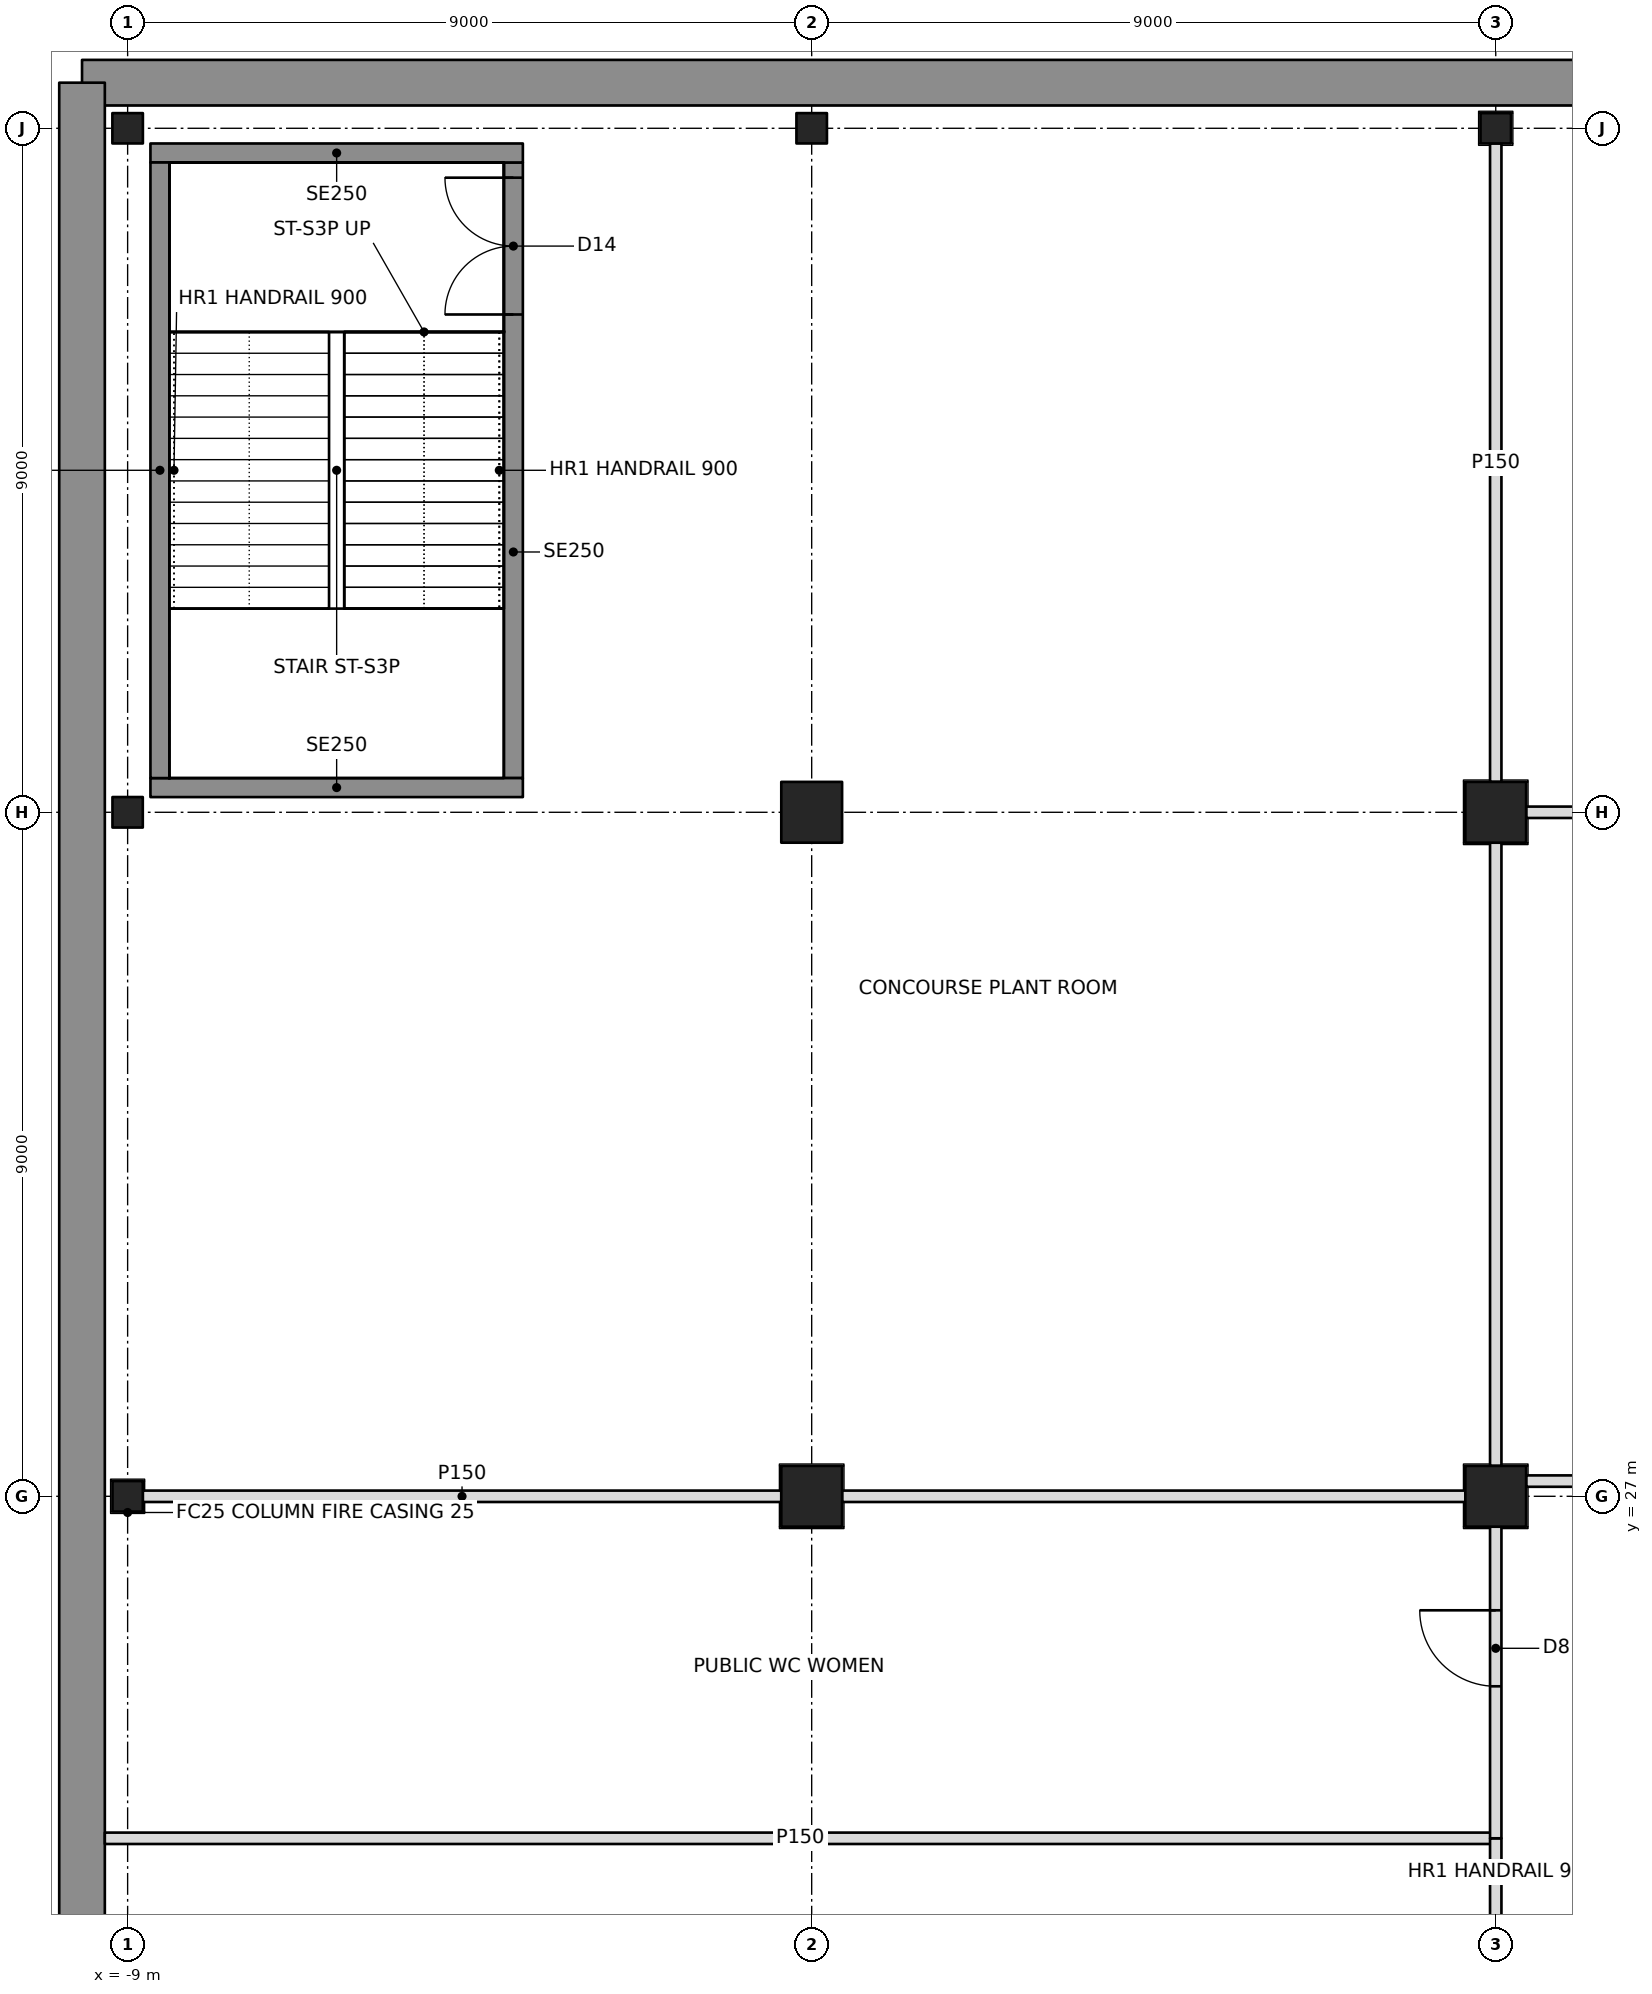
"""IFC4 building model, lengths in metres.
Left out: names, types, materials, properties, quantities, classifications, styles, units other than length and angle.
Written with IfcOpenShell. Run it as: python <this file> out.ifc"""

import sys

from ifc_helpers import new_model, si_unit, direction, frame, frame_2d, origin, origin_2d, place, context, subcontext, project, spatial, rectangle, hollow_rectangle, i_section, extrude, element, fill, save


model = new_model("IFC4")
c1 = context("Model", 3, precision=1e-05, world=origin(), true_north=direction((0.0, 1.0)))
c2 = subcontext(c1, "Body", "Model", "MODEL_VIEW")
j1 = project(units=[si_unit("LENGTHUNIT", "METRE"), si_unit("PLANEANGLEUNIT", "RADIAN")], contexts=[c1])
p1 = place(None, origin())
s1 = spatial("IfcSite", under=j1, at=p1, CompositionType="ELEMENT")
p2 = place(p1, origin())
s2 = spatial("IfcBuilding", under=s1, at=p2, CompositionType="ELEMENT")
p3 = place(p2, frame((0.0, 0.0, -5.5)))
s3 = spatial("IfcBuildingStorey", under=s2, at=p3, CompositionType="ELEMENT", Elevation=-5.5)
for number, where, z_axis, x_axis in (
    (1, (-9.0, 27.0, 0.0), (0.0, 0.0, 1.0), (0.0, 1.0, 0.0)),
    (2, (-9.0, 36.0, 0.0), (0.0, 0.0, 1.0), (0.0, 1.0, 0.0)),
    (3, (-9.0, 45.0, 0.0), (0.0, 0.0, 1.0), (1.0, 0.0, 0.0)),
):
    element("IfcColumn", number, at=place(p3, frame(where, z_axis=z_axis, x_axis=x_axis)), inside=s3, PredefinedType="COLUMN", context=c2, shape_type="SweptSolid", body=[
        extrude(i_section(OverallWidth=0.401, OverallDepth=0.399, WebThickness=0.025, FlangeThickness=0.04, at=origin_2d()), origin(), (0.0, 0.0, 1.0), 5.5),
    ])
for number, where, z_axis, x_axis in (
    (4, (0.0, 27.0, 0.0), (0.0, 0.0, 1.0), (0.0, 1.0, 0.0)),
    (5, (0.0, 36.0, 0.0), (0.0, 0.0, 1.0), (1.0, 0.0, 0.0)),
):
    element("IfcColumn", number, at=place(p3, frame(where, z_axis=z_axis, x_axis=x_axis)), inside=s3, PredefinedType="COLUMN", context=c2, shape_type="SweptSolid", body=[
        extrude(hollow_rectangle(XDim=0.8, YDim=0.8, WallThickness=0.1, at=origin_2d()), origin(), (0.0, 0.0, 1.0), 5.5),
    ])
p4 = place(p3, frame((0.0, 45.0, 0.0), z_axis=(0.0, 0.0, 1.0), x_axis=(1.0, 0.0, 0.0)))
e6 = element("IfcColumn", 6, at=p4, inside=s3, PredefinedType="COLUMN", context=c2, shape_type="SweptSolid", body=[
    extrude(i_section(OverallWidth=0.401, OverallDepth=0.399, WebThickness=0.025, FlangeThickness=0.04, at=origin_2d()), origin(), (0.0, 0.0, 1.0), 5.5),
])
for number, where, z_axis, x_axis in (
    (7, (9.0, 27.0, 0.0), (0.0, 0.0, 1.0), (1.0, 0.0, 0.0)),
    (8, (9.0, 36.0, 0.0), (0.0, 0.0, 1.0), (1.0, 0.0, 0.0)),
):
    element("IfcColumn", number, at=place(p3, frame(where, z_axis=z_axis, x_axis=x_axis)), inside=s3, PredefinedType="COLUMN", context=c2, shape_type="SweptSolid", body=[
        extrude(hollow_rectangle(XDim=0.8, YDim=0.8, WallThickness=0.1, at=origin_2d()), origin(), (0.0, 0.0, 1.0), 5.5),
    ])
p5 = place(p3, frame((9.0, 45.0, 0.0), z_axis=(0.0, 0.0, 1.0), x_axis=(1.0, 0.0, 0.0)))
e9 = element("IfcColumn", 9, at=p5, inside=s3, PredefinedType="COLUMN", context=c2, shape_type="SweptSolid", body=[
    extrude(i_section(OverallWidth=0.401, OverallDepth=0.399, WebThickness=0.025, FlangeThickness=0.04, at=origin_2d()), origin(), (0.0, 0.0, 1.0), 5.5),
])
for number, where, z_axis, x_axis in (
    (10, (63.6, 45.6, -0.3), (0.0, 0.0, 1.0), (-1.0, 0.0, 0.0)),
    (11, (-9.6, 45.6, -0.3), (0.0, 0.0, 1.0), (0.0, -1.0, 0.0)),
):
    element("IfcWall", number, at=place(p3, frame(where, z_axis=z_axis, x_axis=x_axis)), inside=s3, PredefinedType="SOLIDWALL", context=c2, shape_type="SweptSolid", body=[
        extrude(rectangle(XDim=73.2, YDim=0.6, at=frame_2d((36.6, 0.0))), origin(), (0.0, 0.0, 1.0), 5.5),
    ])
p6 = place(p3, frame((-9.3, 22.5, 0.0), z_axis=(0.0, 0.0, 1.0), x_axis=(1.0, 0.0, 0.0)))
e12 = element("IfcWall", 12, at=p6, inside=s3, PredefinedType="PARTITIONING", context=c2, shape_type="SweptSolid", body=[
    extrude(rectangle(XDim=18.3, YDim=0.15, at=frame_2d((9.15, 0.0))), origin(), (0.0, 0.0, 1.0), 4.252),
])
p7 = place(p3, frame((-8.801, 27.0, 0.0), z_axis=(0.0, 0.0, 1.0), x_axis=(1.0, 0.0, 0.0)))
e13 = element("IfcWall", 13, at=p7, inside=s3, PredefinedType="PARTITIONING", context=c2, shape_type="SweptSolid", body=[
    extrude(rectangle(XDim=8.401, YDim=0.15, at=frame_2d((4.2, 0.0))), origin(), (0.0, 0.0, 1.0), 4.253),
])
p8 = place(p3, frame((0.4, 27.0, 0.0), z_axis=(0.0, 0.0, 1.0), x_axis=(1.0, 0.0, 0.0)))
e14 = element("IfcWall", 14, at=p8, inside=s3, PredefinedType="PARTITIONING", context=c2, shape_type="SweptSolid", body=[
    extrude(rectangle(XDim=8.2, YDim=0.15, at=frame_2d((4.1, 0.0))), origin(), (0.0, 0.0, 1.0), 4.253),
])
p9 = place(p3, frame((9.0, 22.5, 0.0), z_axis=(0.0, 0.0, 1.0), x_axis=(0.0, -1.0, 0.0)))
e15 = element("IfcWall", 15, at=p9, inside=s3, PredefinedType="PARTITIONING", context=c2, shape_type="SweptSolid", body=[
    extrude(rectangle(XDim=4.1, YDim=0.15, at=frame_2d((2.05, 0.0))), origin(), (0.0, 0.0, 1.0), 4.253),
])
p10 = place(p9, frame((1.5, 0.0, 0.0)))
e16 = element("IfcOpeningElement", 16, at=p10, cuts=e15, PredefinedType="OPENING", context=c2, shape_type="SweptSolid", body=[
    extrude(rectangle(XDim=1.0, YDim=2.1, at=frame_2d((0.5, 1.05))), frame((0.0, 0.085, 0.0), z_axis=(0.0, -1.0, 0.0), x_axis=(1.0, 0.0, 0.0)), (0.0, 0.0, 1.0), 0.17),
])
p11 = place(p3, frame((9.0, 26.6, 0.0), z_axis=(0.0, 0.0, 1.0), x_axis=(0.0, -1.0, 0.0)))
e17 = element("IfcWall", 17, at=p11, inside=s3, PredefinedType="PARTITIONING", context=c2, shape_type="SweptSolid", body=[
    extrude(rectangle(XDim=4.1, YDim=0.15, at=frame_2d((2.05, 0.0))), origin(), (0.0, 0.0, 1.0), 4.253),
])
p12 = place(p11, frame((1.1, 0.0, 0.0)))
e18 = element("IfcOpeningElement", 18, at=p12, cuts=e17, PredefinedType="OPENING", context=c2, shape_type="SweptSolid", body=[
    extrude(rectangle(XDim=1.0, YDim=2.1, at=frame_2d((0.5, 1.05))), frame((0.0, 0.085, 0.0), z_axis=(0.0, -1.0, 0.0), x_axis=(1.0, 0.0, 0.0)), (0.0, 0.0, 1.0), 0.17),
])
p13 = place(p3, frame((17.6, 27.2, 0.0), z_axis=(0.0, 0.0, 1.0), x_axis=(-1.0, 0.0, 0.0)))
e19 = element("IfcWall", 19, at=p13, inside=s3, PredefinedType="PARTITIONING", context=c2, shape_type="SweptSolid", body=[
    extrude(rectangle(XDim=8.2, YDim=0.15, at=frame_2d((4.1, 0.0))), origin(), (0.0, 0.0, 1.0), 4.253),
])
p14 = place(p13, frame((3.0, 0.0, 0.0)))
e20 = element("IfcOpeningElement", 20, at=p14, cuts=e19, PredefinedType="OPENING", context=c2, shape_type="SweptSolid", body=[
    extrude(rectangle(XDim=1.0, YDim=2.1, at=frame_2d((0.5, 1.05))), frame((0.0, 0.085, 0.0), z_axis=(0.0, -1.0, 0.0), x_axis=(1.0, 0.0, 0.0)), (0.0, 0.0, 1.0), 0.17),
])
for number, where, z_axis, x_axis in (
    (21, (9.0, 27.4, 0.0), (0.0, 0.0, 1.0), (0.0, 1.0, 0.0)),
    (22, (17.6, 36.0, 0.0), (0.0, 0.0, 1.0), (-1.0, 0.0, 0.0)),
):
    element("IfcWall", number, at=place(p3, frame(where, z_axis=z_axis, x_axis=x_axis)), inside=s3, PredefinedType="PARTITIONING", context=c2, shape_type="SweptSolid", body=[
        extrude(rectangle(XDim=8.2, YDim=0.15, at=frame_2d((4.1, 0.0))), origin(), (0.0, 0.0, 1.0), 4.253),
    ])
p15 = place(p3, frame((9.0, 36.4, 0.0), z_axis=(0.0, 0.0, 1.0), x_axis=(0.0, 1.0, 0.0)))
e23 = element("IfcWall", 23, at=p15, inside=s3, PredefinedType="PARTITIONING", context=c2, shape_type="SweptSolid", body=[
    extrude(rectangle(XDim=8.401, YDim=0.15, at=frame_2d((4.2, 0.0))), origin(), (0.0, 0.0, 1.0), 4.253),
])
for number, where, z_axis, x_axis in (
    (24, (-8.7, 36.325, 0.0), (0.0, 0.0, 1.0), (1.0, 0.0, 0.0)),
    (25, (-8.7, 44.675, 0.0), (0.0, 0.0, 1.0), (1.0, 0.0, 0.0)),
):
    element("IfcWall", number, at=place(p3, frame(where, z_axis=z_axis, x_axis=x_axis)), inside=s3, PredefinedType="SOLIDWALL", context=c2, shape_type="SweptSolid", body=[
        extrude(rectangle(XDim=4.9, YDim=0.25, at=frame_2d((2.45, 0.0))), origin(), (0.0, 0.0, 1.0), 5.2),
    ])
p16 = place(p3, frame((-8.575, 36.45, 0.0), z_axis=(0.0, 0.0, 1.0), x_axis=(0.0, 1.0, 0.0)))
e26 = element("IfcWall", 26, at=p16, inside=s3, PredefinedType="SOLIDWALL", context=c2, shape_type="SweptSolid", body=[
    extrude(rectangle(XDim=8.1, YDim=0.25, at=frame_2d((4.05, 0.0))), origin(), (0.0, 0.0, 1.0), 5.2),
])
p17 = place(p3, frame((-3.925, 36.45, 0.0), z_axis=(0.0, 0.0, 1.0), x_axis=(0.0, 1.0, 0.0)))
e27 = element("IfcWall", 27, at=p17, inside=s3, PredefinedType="SOLIDWALL", context=c2, shape_type="SweptSolid", body=[
    extrude(rectangle(XDim=8.1, YDim=0.25, at=frame_2d((4.05, 0.0))), origin(), (0.0, 0.0, 1.0), 5.2),
])
p18 = place(p17, frame((6.1, 0.0, 0.0)))
e28 = element("IfcOpeningElement", 28, at=p18, cuts=e27, PredefinedType="OPENING", context=c2, shape_type="SweptSolid", body=[
    extrude(rectangle(XDim=1.8, YDim=2.1, at=frame_2d((0.9, 1.05))), frame((0.0, 0.135, 0.0), z_axis=(0.0, -1.0, 0.0), x_axis=(1.0, 0.0, 0.0)), (0.0, 0.0, 1.0), 0.27),
])
p19 = place(p12, frame((1.0, 0.0, 0.0), z_axis=(0.0, 0.0, 1.0), x_axis=(-1.0, 0.0, 0.0)))
e29 = element("IfcDoor", 29, at=p19, inside=s3, OperationType="SINGLE_SWING_RIGHT", PredefinedType="DOOR", context=c2, shape_type="SweptSolid", body=[
    extrude(rectangle(XDim=1.0, YDim=2.1, at=frame_2d((0.5, 1.05))), frame((0.0, 0.025, 0.0), z_axis=(0.0, -1.0, 0.0), x_axis=(1.0, 0.0, 0.0)), (0.0, 0.0, 1.0), 0.05),
])
fill(e18, e29)
p20 = place(p18, origin())
e30 = element("IfcDoor", 30, at=p20, inside=s3, OperationType="DOUBLE_DOOR_SINGLE_SWING", PredefinedType="DOOR", context=c2, shape_type="SweptSolid", body=[
    extrude(rectangle(XDim=1.8, YDim=2.1, at=frame_2d((0.9, 1.05))), frame((0.0, 0.025, 0.0), z_axis=(0.0, -1.0, 0.0), x_axis=(1.0, 0.0, 0.0)), (0.0, 0.0, 1.0), 0.05),
])
fill(e28, e30)
save(model, sys.argv[1])
